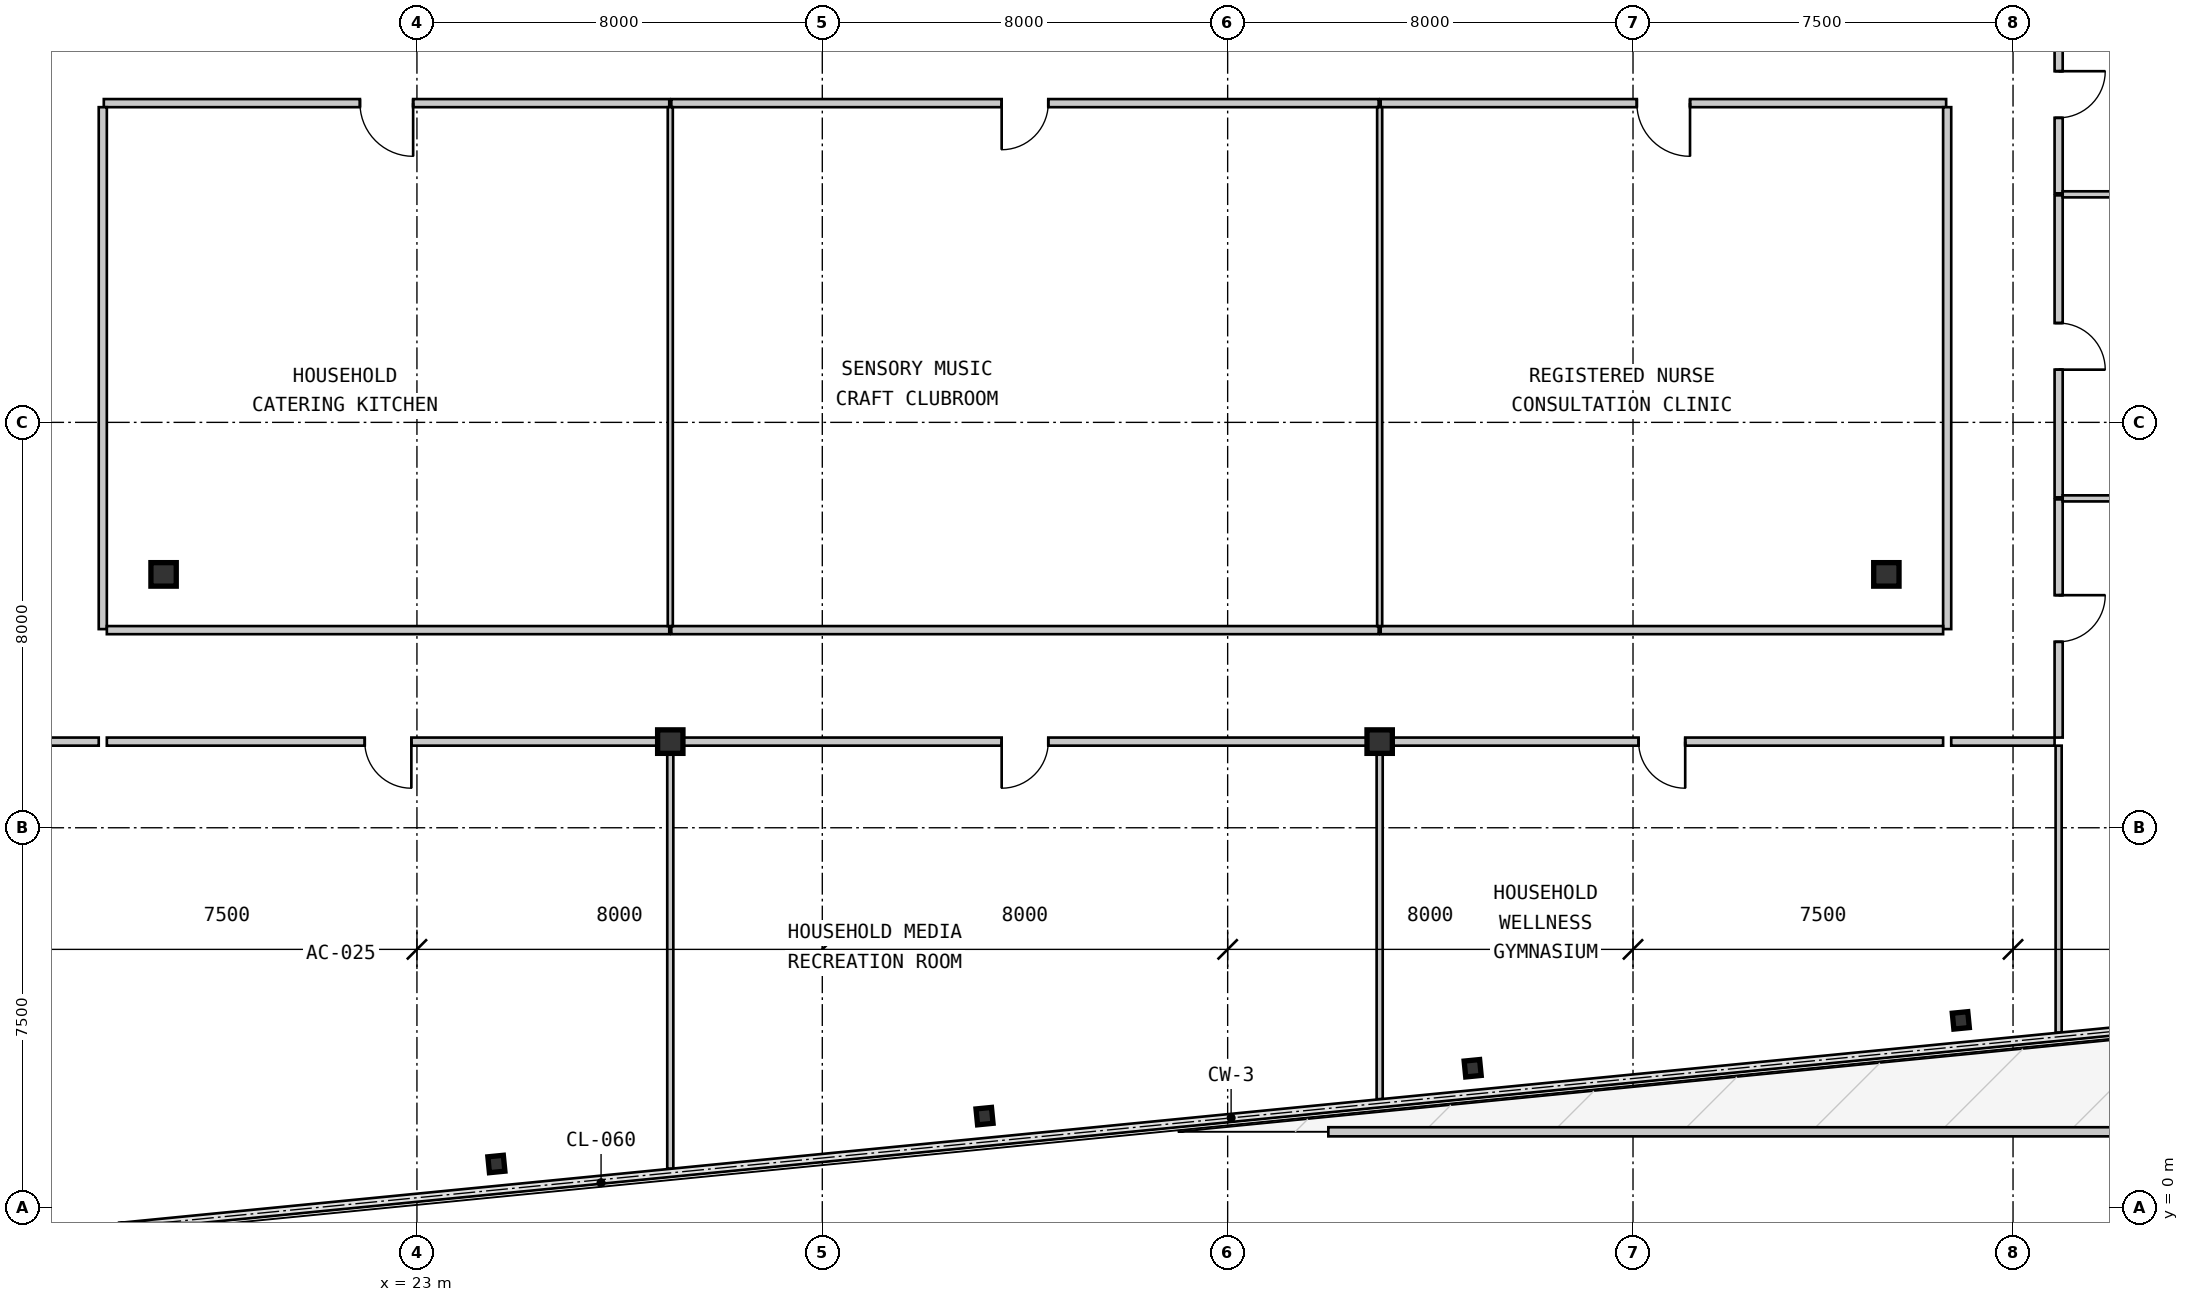
"""IFC4 building model, lengths in metres.
Left out: names, types, materials, properties, quantities, classifications, styles, units other than length and angle.
Written with IfcOpenShell. Run it as: python <this file> out.ifc"""

import sys

from ifc_helpers import new_model, si_unit, direction, frame, frame_2d, origin, origin_2d, place, context, subcontext, project, spatial, rectangle, i_section, extrude, source, transform, mapped, element, fill, save


model = new_model("IFC4")
c1 = context("Model", 3, precision=1e-05, world=origin(), true_north=direction((0.0, 1.0)))
c2 = subcontext(c1, "Body", "Model", "MODEL_VIEW")
j1 = project(units=[si_unit("LENGTHUNIT", "METRE"), si_unit("PLANEANGLEUNIT", "RADIAN")], contexts=[c1])
p1 = place(None, origin())
s1 = spatial("IfcSite", under=j1, at=p1, CompositionType="ELEMENT")
p2 = place(p1, origin())
s2 = spatial("IfcBuilding", under=s1, at=p2, CompositionType="ELEMENT")
p3 = place(p2, frame((0.0, 0.0, 65.1)))
s3 = spatial("IfcBuildingStorey", under=s2, at=p3, CompositionType="ELEMENT", Elevation=65.1)
m1 = source(origin(), c2, "Body", "SweptSolid", [
    extrude(i_section(OverallWidth=0.5, OverallDepth=0.464, WebThickness=0.022, FlangeThickness=0.034, at=origin_2d()), origin(), (0.0, 0.0, 1.0), 3.15),
])
for number, where, z_axis, x_axis in (
    (1, (28.0, 9.2, 0.0), (0.0, 0.0, 1.0), (1.0, 0.0, 0.0)),
    (2, (42.0, 9.2, 0.0), (0.0, 0.0, 1.0), (1.0, 0.0, 0.0)),
    (3, (18.0, 12.5, 0.0), (0.0, 0.0, 1.0), (1.0, 0.0, 0.0)),
    (4, (52.0, 12.5, 0.0), (0.0, 0.0, 1.0), (1.0, 0.0, 0.0)),
):
    element("IfcColumn", number, at=place(p3, frame(where, z_axis=z_axis, x_axis=x_axis)), inside=s3, PredefinedType="COLUMN", context=c2, shape_type="MappedRepresentation", body=[
        mapped(m1, transform((0.0, 0.0, 0.0), scale=1.0)),
    ])
m2 = source(origin(), c2, "Body", "SweptSolid", [
    extrude(i_section(OverallWidth=0.307, OverallDepth=0.315, WebThickness=0.012, FlangeThickness=0.019, at=origin_2d()), origin(), (0.0, 0.0, 1.0), 3.15),
])
for number, where, z_axis, x_axis in (
    (5, (24.568, 0.865, 0.0), (0.0, 0.0, 1.0), (0.995, 0.098, 0.0)),
    (6, (34.202, 1.809, 0.0), (0.0, 0.0, 1.0), (0.995, 0.098, 0.0)),
    (7, (43.835, 2.754, 0.0), (0.0, 0.0, 1.0), (0.995, 0.098, 0.0)),
    (8, (53.469, 3.698, 0.0), (0.0, 0.0, 1.0), (0.995, 0.098, 0.0)),
):
    element("IfcColumn", number, at=place(p3, frame(where, z_axis=z_axis, x_axis=x_axis)), inside=s3, PredefinedType="COLUMN", context=c2, shape_type="MappedRepresentation", body=[
        mapped(m2, transform((0.0, 0.0, 0.0), scale=1.0)),
    ])
m3 = source(origin(), c2, "Body", "SweptSolid", [
    extrude(rectangle(XDim=21.013, YDim=0.18, at=frame_2d((10.506, 0.0))), origin(), (0.0, 0.0, 1.0), 1.15),
])
p4 = place(p3, frame((62.0, 1.5, 0.0), z_axis=(0.0, 0.0, 1.0), x_axis=(-1.0, 0.0, 0.0)))
e9 = element("IfcWall", 9, at=p4, inside=s3, PredefinedType="PARAPET", context=c2, shape_type="MappedRepresentation", body=[
    mapped(m3, transform((0.0, 0.0, 0.0), scale=1.0)),
])
m4 = source(origin(), c2, "Body", "SweptSolid", [
    extrude(rectangle(XDim=11.159, YDim=0.16, at=frame_2d((5.58, 0.0))), origin(), (0.0, 0.0, 1.0), 2.93),
])
p5 = place(p3, frame((27.98, 21.8, 0.0), z_axis=(0.0, 0.0, 1.0), x_axis=(-1.0, 0.0, 0.0)))
e10 = element("IfcWall", 10, at=p5, inside=s3, PredefinedType="PARTITIONING", context=c2, shape_type="MappedRepresentation", body=[
    mapped(m4, transform((0.0, 0.0, 0.0), scale=1.0)),
])
m5 = source(origin(), c2, "Body", "SweptSolid", [
    extrude(rectangle(XDim=1.05, YDim=2.1, at=frame_2d((0.525, 1.05))), frame((0.0, 0.09, 0.0), z_axis=(0.0, -1.0, 0.0), x_axis=(1.0, 0.0, 0.0)), (0.0, 0.0, 1.0), 0.18),
])
p6 = place(p5, frame((5.055, 0.0, 0.0)))
e11 = element("IfcOpeningElement", 11, at=p6, cuts=e10, PredefinedType="OPENING", context=c2, shape_type="MappedRepresentation", body=[
    mapped(m5, transform((0.0, 0.0, 0.0), scale=1.0)),
])
m6 = source(origin(), c2, "Body", "SweptSolid", [
    extrude(rectangle(XDim=10.3, YDim=0.16, at=frame_2d((5.15, 0.0))), origin(), (0.0, 0.0, 1.0), 2.93),
])
p7 = place(p3, frame((16.8, 21.72, 0.0), z_axis=(0.0, 0.0, 1.0), x_axis=(0.0, -1.0, 0.0)))
e12 = element("IfcWall", 12, at=p7, inside=s3, PredefinedType="PARTITIONING", context=c2, shape_type="MappedRepresentation", body=[
    mapped(m6, transform((0.0, 0.0, 0.0), scale=1.0)),
])
m7 = source(origin(), c2, "Body", "SweptSolid", [
    extrude(rectangle(XDim=13.959, YDim=0.16, at=frame_2d((6.98, 0.0))), origin(), (0.0, 0.0, 1.0), 2.93),
])
p8 = place(p3, frame((41.98, 21.8, 0.0), z_axis=(0.0, 0.0, 1.0), x_axis=(-1.0, 0.0, 0.0)))
e13 = element("IfcWall", 13, at=p8, inside=s3, PredefinedType="PARTITIONING", context=c2, shape_type="MappedRepresentation", body=[
    mapped(m7, transform((0.0, 0.0, 0.0), scale=1.0)),
])
m8 = source(origin(), c2, "Body", "SweptSolid", [
    extrude(rectangle(XDim=0.92, YDim=2.1, at=frame_2d((0.46, 1.05))), frame((0.0, 0.09, 0.0), z_axis=(0.0, -1.0, 0.0), x_axis=(1.0, 0.0, 0.0)), (0.0, 0.0, 1.0), 0.18),
])
p9 = place(p8, frame((6.52, 0.0, 0.0)))
e14 = element("IfcOpeningElement", 14, at=p9, cuts=e13, PredefinedType="OPENING", context=c2, shape_type="MappedRepresentation", body=[
    mapped(m8, transform((0.0, 0.0, 0.0), scale=1.0)),
])
p10 = place(p3, frame((53.18, 21.8, 0.0), z_axis=(0.0, 0.0, 1.0), x_axis=(-1.0, 0.0, 0.0)))
e15 = element("IfcWall", 15, at=p10, inside=s3, PredefinedType="PARTITIONING", context=c2, shape_type="MappedRepresentation", body=[
    mapped(m4, transform((0.0, 0.0, 0.0), scale=1.0)),
])
p11 = place(p10, frame((5.055, 0.0, 0.0)))
e16 = element("IfcOpeningElement", 16, at=p11, cuts=e15, PredefinedType="OPENING", context=c2, shape_type="MappedRepresentation", body=[
    mapped(m5, transform((0.0, 0.0, 0.0), scale=1.0)),
])
p12 = place(p3, frame((53.2, 11.42, 0.0), z_axis=(0.0, 0.0, 1.0), x_axis=(0.0, 1.0, 0.0)))
e17 = element("IfcWall", 17, at=p12, inside=s3, PredefinedType="PARTITIONING", context=c2, shape_type="MappedRepresentation", body=[
    mapped(m6, transform((0.0, 0.0, 0.0), scale=1.0)),
])
m9 = source(origin(), c2, "Body", "SweptSolid", [
    extrude(rectangle(XDim=2.04, YDim=0.16, at=frame_2d((1.02, 0.0))), origin(), (0.0, 0.0, 1.0), 2.93),
])
for number, where, z_axis, x_axis in (
    (18, (16.72, 9.2, 0.0), (0.0, 0.0, 1.0), (-1.0, 0.0, 0.0)),
    (19, (55.32, 9.2, 0.0), (0.0, 0.0, 1.0), (-1.0, 0.0, 0.0)),
):
    element("IfcWall", number, at=place(p3, frame(where, z_axis=z_axis, x_axis=x_axis)), inside=s3, PredefinedType="PARTITIONING", context=c2, shape_type="MappedRepresentation", body=[
        mapped(m9, transform((0.0, 0.0, 0.0), scale=1.0)),
    ])
m10 = source(origin(), c2, "Body", "SweptSolid", [
    extrude(rectangle(XDim=4.7, YDim=0.16, at=frame_2d((2.35, 0.0))), origin(), (0.0, 0.0, 1.0), 2.93),
])
p13 = place(p3, frame((55.4, 13.98, 0.0), z_axis=(0.0, 0.0, 1.0), x_axis=(0.0, -1.0, 0.0)))
e20 = element("IfcWall", 20, at=p13, inside=s3, PredefinedType="PARTITIONING", context=c2, shape_type="MappedRepresentation", body=[
    mapped(m10, transform((0.0, 0.0, 0.0), scale=1.0)),
])
p14 = place(p13, frame((1.89, 0.0, 0.0)))
e21 = element("IfcOpeningElement", 21, at=p14, cuts=e20, PredefinedType="OPENING", context=c2, shape_type="MappedRepresentation", body=[
    mapped(m8, transform((0.0, 0.0, 0.0), scale=1.0)),
])
m11 = source(origin(), c2, "Body", "SweptSolid", [
    extrude(rectangle(XDim=5.959, YDim=0.16, at=frame_2d((2.98, 0.0))), origin(), (0.0, 0.0, 1.0), 2.93),
])
p15 = place(p3, frame((55.4, 19.98, 0.0), z_axis=(0.0, 0.0, 1.0), x_axis=(0.0, -1.0, 0.0)))
e22 = element("IfcWall", 22, at=p15, inside=s3, PredefinedType="PARTITIONING", context=c2, shape_type="MappedRepresentation", body=[
    mapped(m11, transform((0.0, 0.0, 0.0), scale=1.0)),
])
p16 = place(p15, frame((2.52, 0.0, 0.0)))
e23 = element("IfcOpeningElement", 23, at=p16, cuts=e22, PredefinedType="OPENING", context=c2, shape_type="MappedRepresentation", body=[
    mapped(m8, transform((0.0, 0.0, 0.0), scale=1.0)),
])
m12 = source(origin(), c2, "Body", "SweptSolid", [
    extrude(rectangle(XDim=3.9, YDim=0.16, at=frame_2d((1.95, 0.0))), origin(), (0.0, 0.0, 1.0), 2.93),
])
p17 = place(p3, frame((55.4, 23.92, 0.0), z_axis=(0.0, 0.0, 1.0), x_axis=(0.0, -1.0, 0.0)))
e24 = element("IfcWall", 24, at=p17, inside=s3, PredefinedType="PARTITIONING", context=c2, shape_type="MappedRepresentation", body=[
    mapped(m12, transform((0.0, 0.0, 0.0), scale=1.0)),
])
p18 = place(p17, frame((1.49, 0.0, 0.0)))
e25 = element("IfcOpeningElement", 25, at=p18, cuts=e24, PredefinedType="OPENING", context=c2, shape_type="MappedRepresentation", body=[
    mapped(m8, transform((0.0, 0.0, 0.0), scale=1.0)),
])
m13 = source(origin(), c2, "Body", "SweptSolid", [
    extrude(rectangle(XDim=11.1, YDim=0.16, at=frame_2d((5.55, 0.0))), origin(), (0.0, 0.0, 1.0), 2.93),
])
p19 = place(p3, frame((16.88, 11.4, 0.0), z_axis=(0.0, 0.0, 1.0), x_axis=(1.0, 0.0, 0.0)))
e26 = element("IfcWall", 26, at=p19, inside=s3, PredefinedType="PARTITIONING", context=c2, shape_type="MappedRepresentation", body=[
    mapped(m13, transform((0.0, 0.0, 0.0), scale=1.0)),
])
p20 = place(p3, frame((28.02, 11.4, 0.0), z_axis=(0.0, 0.0, 1.0), x_axis=(1.0, 0.0, 0.0)))
e27 = element("IfcWall", 27, at=p20, inside=s3, PredefinedType="PARTITIONING", context=c2, shape_type="MappedRepresentation", body=[
    mapped(m7, transform((0.0, 0.0, 0.0), scale=1.0)),
])
p21 = place(p3, frame((42.02, 11.4, 0.0), z_axis=(0.0, 0.0, 1.0), x_axis=(1.0, 0.0, 0.0)))
e28 = element("IfcWall", 28, at=p21, inside=s3, PredefinedType="PARTITIONING", context=c2, shape_type="MappedRepresentation", body=[
    mapped(m13, transform((0.0, 0.0, 0.0), scale=1.0)),
])
p22 = place(p3, frame((27.98, 9.2, 0.0), z_axis=(0.0, 0.0, 1.0), x_axis=(-1.0, 0.0, 0.0)))
e29 = element("IfcWall", 29, at=p22, inside=s3, PredefinedType="PARTITIONING", context=c2, shape_type="MappedRepresentation", body=[
    mapped(m13, transform((0.0, 0.0, 0.0), scale=1.0)),
])
p23 = place(p22, frame((5.09, 0.0, 0.0)))
e30 = element("IfcOpeningElement", 30, at=p23, cuts=e29, PredefinedType="OPENING", context=c2, shape_type="MappedRepresentation", body=[
    mapped(m8, transform((0.0, 0.0, 0.0), scale=1.0)),
])
m14 = source(origin(), c2, "Body", "SweptSolid", [
    extrude(rectangle(XDim=13.959, YDim=0.16, at=frame_2d((6.98, 0.0))), origin(), (0.0, 0.0, 1.0), 2.328),
])
p24 = place(p3, frame((41.98, 9.2, 0.0), z_axis=(0.0, 0.0, 1.0), x_axis=(-1.0, 0.0, 0.0)))
e31 = element("IfcWall", 31, at=p24, inside=s3, PredefinedType="PARTITIONING", context=c2, shape_type="MappedRepresentation", body=[
    mapped(m14, transform((0.0, 0.0, 0.0), scale=1.0)),
])
p25 = place(p24, frame((6.52, 0.0, 0.0)))
e32 = element("IfcOpeningElement", 32, at=p25, cuts=e31, PredefinedType="OPENING", context=c2, shape_type="MappedRepresentation", body=[
    mapped(m8, transform((0.0, 0.0, 0.0), scale=1.0)),
])
p26 = place(p3, frame((53.12, 9.2, 0.0), z_axis=(0.0, 0.0, 1.0), x_axis=(-1.0, 0.0, 0.0)))
e33 = element("IfcWall", 33, at=p26, inside=s3, PredefinedType="PARTITIONING", context=c2, shape_type="MappedRepresentation", body=[
    mapped(m13, transform((0.0, 0.0, 0.0), scale=1.0)),
])
p27 = place(p26, frame((5.09, 0.0, 0.0)))
e34 = element("IfcOpeningElement", 34, at=p27, cuts=e33, PredefinedType="OPENING", context=c2, shape_type="MappedRepresentation", body=[
    mapped(m8, transform((0.0, 0.0, 0.0), scale=1.0)),
])
m15 = source(origin(), c2, "Body", "SweptSolid", [
    extrude(rectangle(XDim=10.24, YDim=0.1, at=frame_2d((5.12, 0.0))), origin(), (0.0, 0.0, 1.0), 2.328),
])
p28 = place(p3, frame((28.0, 21.72, 0.0), z_axis=(0.0, 0.0, 1.0), x_axis=(0.0, -1.0, 0.0)))
e35 = element("IfcWall", 35, at=p28, inside=s3, PredefinedType="MOVABLE", context=c2, shape_type="MappedRepresentation", body=[
    mapped(m15, transform((0.0, 0.0, 0.0), scale=1.0)),
])
m16 = source(origin(), c2, "Body", "SweptSolid", [
    extrude(rectangle(XDim=10.24, YDim=0.1, at=frame_2d((5.12, 0.0))), origin(), (0.0, 0.0, 1.0), 2.93),
])
p29 = place(p3, frame((42.0, 21.72, 0.0), z_axis=(0.0, 0.0, 1.0), x_axis=(0.0, -1.0, 0.0)))
e36 = element("IfcWall", 36, at=p29, inside=s3, PredefinedType="MOVABLE", context=c2, shape_type="MappedRepresentation", body=[
    mapped(m16, transform((0.0, 0.0, 0.0), scale=1.0)),
])
m17 = source(origin(), c2, "Body", "SweptSolid", [
    extrude(rectangle(XDim=8.349, YDim=0.12, at=frame_2d((4.174, 0.0))), origin(), (0.0, 0.0, 1.0), 2.93),
])
p30 = place(p3, frame((28.0, 9.12, 0.0), z_axis=(0.0, 0.0, 1.0), x_axis=(0.0, -1.0, 0.0)))
e37 = element("IfcWall", 37, at=p30, inside=s3, PredefinedType="PARTITIONING", context=c2, shape_type="MappedRepresentation", body=[
    mapped(m17, transform((0.0, 0.0, 0.0), scale=1.0)),
])
m18 = source(origin(), c2, "Body", "SweptSolid", [
    extrude(rectangle(XDim=6.976, YDim=0.12, at=frame_2d((3.488, 0.0))), origin(), (0.0, 0.0, 1.0), 2.93),
])
p31 = place(p3, frame((42.0, 9.12, 0.0), z_axis=(0.0, 0.0, 1.0), x_axis=(0.0, -1.0, 0.0)))
e38 = element("IfcWall", 38, at=p31, inside=s3, PredefinedType="PARTITIONING", context=c2, shape_type="MappedRepresentation", body=[
    mapped(m18, transform((0.0, 0.0, 0.0), scale=1.0)),
])
m19 = source(origin(), c2, "Body", "SweptSolid", [
    extrude(rectangle(XDim=5.662, YDim=0.12, at=frame_2d((2.831, 0.0))), origin(), (0.0, 0.0, 1.0), 2.93),
])
p32 = place(p3, frame((55.4, 9.12, 0.0), z_axis=(0.0, 0.0, 1.0), x_axis=(0.0, -1.0, 0.0)))
e39 = element("IfcWall", 39, at=p32, inside=s3, PredefinedType="PARTITIONING", context=c2, shape_type="MappedRepresentation", body=[
    mapped(m19, transform((0.0, 0.0, 0.0), scale=1.0)),
])
m20 = source(origin(), c2, "Body", "SweptSolid", [
    extrude(rectangle(XDim=10.301, YDim=0.12, at=frame_2d((5.15, 0.0))), origin(), (0.0, 0.0, 1.0), 2.93),
])
p33 = place(p3, frame((55.48, 14.0, 0.0), z_axis=(0.0, 0.0, 1.0), x_axis=(1.0, 0.0, 0.0)))
e40 = element("IfcWall", 40, at=p33, inside=s3, PredefinedType="PARTITIONING", context=c2, shape_type="MappedRepresentation", body=[
    mapped(m20, transform((0.0, 0.0, 0.0), scale=1.0)),
])
m21 = source(origin(), c2, "Body", "SweptSolid", [
    extrude(rectangle(XDim=9.712, YDim=0.12, at=frame_2d((4.856, 0.0))), origin(), (0.0, 0.0, 1.0), 2.93),
])
p34 = place(p3, frame((55.48, 20.0, 0.0), z_axis=(0.0, 0.0, 1.0), x_axis=(1.0, 0.0, 0.0)))
e41 = element("IfcWall", 41, at=p34, inside=s3, PredefinedType="PARTITIONING", context=c2, shape_type="MappedRepresentation", body=[
    mapped(m21, transform((0.0, 0.0, 0.0), scale=1.0)),
])
m22 = source(origin(), c2, "Body", "SweptSolid", [
    extrude(rectangle(XDim=1.05, YDim=2.1, at=frame_2d((0.525, 1.05))), frame((0.0, 0.025, 0.0), z_axis=(0.0, -1.0, 0.0), x_axis=(1.0, 0.0, 0.0)), (0.0, 0.0, 1.0), 0.05),
])
p35 = place(p6, origin())
e42 = element("IfcDoor", 42, at=p35, inside=s3, OperationType="SINGLE_SWING_LEFT", PredefinedType="DOOR", context=c2, shape_type="MappedRepresentation", body=[
    mapped(m22, transform((0.0, 0.0, 0.0), scale=1.0)),
])
fill(e11, e42)
m23 = source(origin(), c2, "Body", "SweptSolid", [
    extrude(rectangle(XDim=0.92, YDim=2.1, at=frame_2d((0.46, 1.05))), frame((0.0, 0.025, 0.0), z_axis=(0.0, -1.0, 0.0), x_axis=(1.0, 0.0, 0.0)), (0.0, 0.0, 1.0), 0.05),
])
p36 = place(p9, origin())
e43 = element("IfcDoor", 43, at=p36, inside=s3, OperationType="SINGLE_SWING_RIGHT", PredefinedType="DOOR", context=c2, shape_type="MappedRepresentation", body=[
    mapped(m23, transform((0.0, 0.0, 0.0), scale=1.0)),
])
fill(e14, e43)
p37 = place(p11, origin())
e44 = element("IfcDoor", 44, at=p37, inside=s3, OperationType="SINGLE_SWING_LEFT", PredefinedType="DOOR", context=c2, shape_type="MappedRepresentation", body=[
    mapped(m22, transform((0.0, 0.0, 0.0), scale=1.0)),
])
fill(e16, e44)
p38 = place(p14, origin())
e45 = element("IfcDoor", 45, at=p38, inside=s3, OperationType="SINGLE_SWING_LEFT", PredefinedType="DOOR", context=c2, shape_type="MappedRepresentation", body=[
    mapped(m23, transform((0.0, 0.0, 0.0), scale=1.0)),
])
fill(e21, e45)
p39 = place(p16, origin())
e46 = element("IfcDoor", 46, at=p39, inside=s3, OperationType="SINGLE_SWING_RIGHT", PredefinedType="DOOR", context=c2, shape_type="MappedRepresentation", body=[
    mapped(m23, transform((0.0, 0.0, 0.0), scale=1.0)),
])
fill(e23, e46)
p40 = place(p18, origin())
e47 = element("IfcDoor", 47, at=p40, inside=s3, OperationType="SINGLE_SWING_LEFT", PredefinedType="DOOR", context=c2, shape_type="MappedRepresentation", body=[
    mapped(m23, transform((0.0, 0.0, 0.0), scale=1.0)),
])
fill(e25, e47)
p41 = place(p23, origin())
e48 = element("IfcDoor", 48, at=p41, inside=s3, OperationType="SINGLE_SWING_LEFT", PredefinedType="DOOR", context=c2, shape_type="MappedRepresentation", body=[
    mapped(m23, transform((0.0, 0.0, 0.0), scale=1.0)),
])
fill(e30, e48)
p42 = place(p25, origin())
e49 = element("IfcDoor", 49, at=p42, inside=s3, OperationType="SINGLE_SWING_RIGHT", PredefinedType="DOOR", context=c2, shape_type="MappedRepresentation", body=[
    mapped(m23, transform((0.0, 0.0, 0.0), scale=1.0)),
])
fill(e32, e49)
p43 = place(p27, origin())
e50 = element("IfcDoor", 50, at=p43, inside=s3, OperationType="SINGLE_SWING_LEFT", PredefinedType="DOOR", context=c2, shape_type="MappedRepresentation", body=[
    mapped(m23, transform((0.0, 0.0, 0.0), scale=1.0)),
])
fill(e34, e50)
save(model, sys.argv[1])
